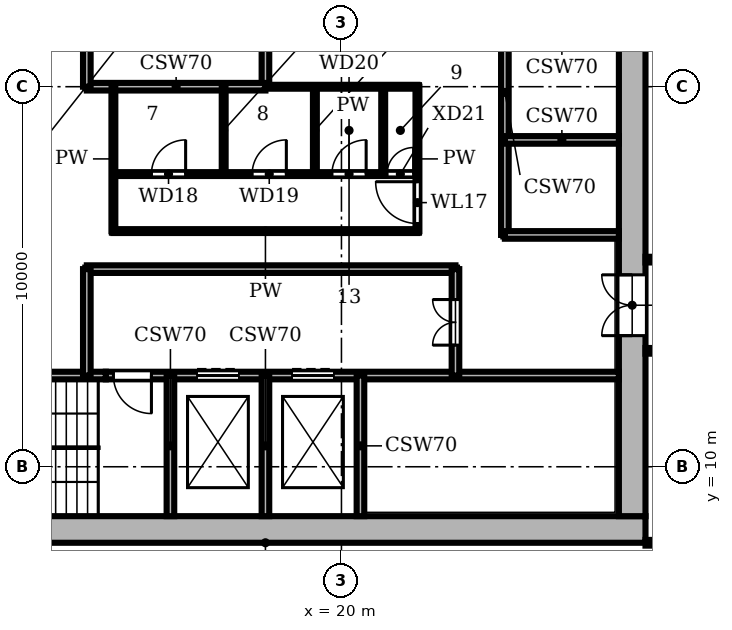
"""IFC4 building model, lengths in metres.
Left out: names, types, materials, properties, quantities, classifications, styles, units other than length and angle.
Written with IfcOpenShell. Run it as: python <this file> out.ifc"""

import sys

from ifc_helpers import new_model, si_unit, direction, frame, frame_2d, origin, place, context, subcontext, project, spatial, rectangle, extrude, element, fill, save


model = new_model("IFC4")
c1 = context("Model", 3, precision=1e-05, world=origin(), true_north=direction((0.0, 1.0)))
c2 = subcontext(c1, "Body", "Model", "MODEL_VIEW")
j1 = project(units=[si_unit("LENGTHUNIT", "METRE"), si_unit("PLANEANGLEUNIT", "RADIAN")], contexts=[c1])
p1 = place(None, origin())
s1 = spatial("IfcSite", under=j1, at=p1, CompositionType="ELEMENT")
p2 = place(p1, origin())
s2 = spatial("IfcBuilding", under=s1, at=p2, CompositionType="ELEMENT")
p3 = place(p2, frame((0.0, 0.0, 209.7)))
s3 = spatial("IfcBuildingStorey", under=s2, at=p3, CompositionType="ELEMENT", Elevation=209.7)
p4 = place(p3, frame((8.0, 8.35, 0.0), z_axis=(0.0, 0.0, 1.0), x_axis=(1.0, 0.0, 0.0)))
e1 = element("IfcWall", 1, at=p4, inside=s3, PredefinedType="SHEAR", context=c2, shape_type="SweptSolid", body=[
    extrude(rectangle(XDim=20.0, YDim=0.7, at=frame_2d((10.0, 0.0))), origin(), (0.0, 0.0, 1.0), 3.9),
])
p5 = place(p3, frame((27.65, 8.7, 0.0), z_axis=(0.0, 0.0, 1.0), x_axis=(0.0, 1.0, 0.0)))
e2 = element("IfcWall", 2, at=p5, inside=s3, PredefinedType="SHEAR", context=c2, shape_type="SweptSolid", body=[
    extrude(rectangle(XDim=18.6, YDim=0.7, at=frame_2d((9.3, 0.0))), origin(), (0.0, 0.0, 1.0), 3.9),
])
p6 = place(p5, frame((4.75, 0.0, 0.0)))
e3 = element("IfcOpeningElement", 3, at=p6, cuts=e2, PredefinedType="OPENING", context=c2, shape_type="SweptSolid", body=[
    extrude(rectangle(XDim=1.6, YDim=2.1, at=frame_2d((0.8, 1.05))), frame((0.0, 0.36, 0.0), z_axis=(0.0, -1.0, 0.0), x_axis=(1.0, 0.0, 0.0)), (0.0, 0.0, 1.0), 0.72),
])
p7 = place(p3, frame((8.7, 12.4, 0.0), z_axis=(0.0, 0.0, 1.0), x_axis=(1.0, 0.0, 0.0)))
e4 = element("IfcWall", 4, at=p7, inside=s3, PredefinedType="SHEAR", context=c2, shape_type="SweptSolid", body=[
    extrude(rectangle(XDim=5.1, YDim=0.2, at=frame_2d((2.55, 0.0))), origin(), (0.0, 0.0, 1.0), 3.58),
])
p8 = place(p3, frame((13.8, 12.4, 0.0), z_axis=(0.0, 0.0, 1.0), x_axis=(1.0, 0.0, 0.0)))
e5 = element("IfcWall", 5, at=p8, inside=s3, PredefinedType="SHEAR", context=c2, shape_type="SweptSolid", body=[
    extrude(rectangle(XDim=13.5, YDim=0.2, at=frame_2d((6.75, 0.0))), origin(), (0.0, 0.0, 1.0), 3.58),
])
p9 = place(p8, frame((2.4, 0.0, 0.0)))
e6 = element("IfcOpeningElement", 6, at=p9, cuts=e5, PredefinedType="OPENING", context=c2, shape_type="SweptSolid", body=[
    extrude(rectangle(XDim=1.1, YDim=2.1, at=frame_2d((0.55, 1.05))), frame((0.0, 0.11, 0.0), z_axis=(0.0, -1.0, 0.0), x_axis=(1.0, 0.0, 0.0)), (0.0, 0.0, 1.0), 0.22),
])
p10 = place(p8, frame((4.9, 0.0, 0.0)))
e7 = element("IfcOpeningElement", 7, at=p10, cuts=e5, PredefinedType="OPENING", context=c2, shape_type="SweptSolid", body=[
    extrude(rectangle(XDim=1.1, YDim=2.1, at=frame_2d((0.55, 1.05))), frame((0.0, 0.11, 0.0), z_axis=(0.0, -1.0, 0.0), x_axis=(1.0, 0.0, 0.0)), (0.0, 0.0, 1.0), 0.22),
])
p11 = place(p8, frame((0.2, 0.0, 0.0)))
e8 = element("IfcOpeningElement", 8, at=p11, cuts=e5, PredefinedType="OPENING", context=c2, shape_type="SweptSolid", body=[
    extrude(rectangle(XDim=1.0, YDim=2.1, at=frame_2d((0.5, 1.05))), frame((0.0, 0.11, 0.0), z_axis=(0.0, -1.0, 0.0), x_axis=(1.0, 0.0, 0.0)), (0.0, 0.0, 1.0), 0.22),
])
p12 = place(p3, frame((13.3, 15.2, 0.0), z_axis=(0.0, 0.0, 1.0), x_axis=(1.0, 0.0, 0.0)))
e9 = element("IfcWall", 9, at=p12, inside=s3, PredefinedType="SHEAR", context=c2, shape_type="SweptSolid", body=[
    extrude(rectangle(XDim=9.7, YDim=0.2, at=frame_2d((4.85, 0.0))), origin(), (0.0, 0.0, 1.0), 3.58),
])
p13 = place(p3, frame((24.3, 16.1, 0.0), z_axis=(0.0, 0.0, 1.0), x_axis=(1.0, 0.0, 0.0)))
e10 = element("IfcWall", 10, at=p13, inside=s3, PredefinedType="SHEAR", context=c2, shape_type="SweptSolid", body=[
    extrude(rectangle(XDim=3.0, YDim=0.2, at=frame_2d((1.5, 0.0))), origin(), (0.0, 0.0, 1.0), 3.58),
])
p14 = place(p3, frame((14.0, 16.2, 0.0), z_axis=(0.0, 0.0, 1.0), x_axis=(1.0, 0.0, 0.0)))
e11 = element("IfcWall", 11, at=p14, inside=s3, PredefinedType="PARTITIONING", context=c2, shape_type="SweptSolid", body=[
    extrude(rectangle(XDim=8.0, YDim=0.1, at=frame_2d((4.0, 0.0))), origin(), (0.0, 0.0, 1.0), 3.58),
])
p15 = place(p3, frame((14.0, 17.7, 0.0), z_axis=(0.0, 0.0, 1.0), x_axis=(1.0, 0.0, 0.0)))
e12 = element("IfcWall", 12, at=p15, inside=s3, PredefinedType="PARTITIONING", context=c2, shape_type="SweptSolid", body=[
    extrude(rectangle(XDim=8.0, YDim=0.1, at=frame_2d((4.0, 0.0))), origin(), (0.0, 0.0, 1.0), 3.58),
])
p16 = place(p15, frame((1.0, 0.0, 0.0)))
e13 = element("IfcOpeningElement", 13, at=p16, cuts=e12, PredefinedType="OPENING", context=c2, shape_type="SweptSolid", body=[
    extrude(rectangle(XDim=0.9, YDim=2.1, at=frame_2d((0.45, 1.05))), frame((0.0, 0.06, 0.0), z_axis=(0.0, -1.0, 0.0), x_axis=(1.0, 0.0, 0.0)), (0.0, 0.0, 1.0), 0.12),
])
p17 = place(p15, frame((3.65, 0.0, 0.0)))
e14 = element("IfcOpeningElement", 14, at=p17, cuts=e12, PredefinedType="OPENING", context=c2, shape_type="SweptSolid", body=[
    extrude(rectangle(XDim=0.9, YDim=2.1, at=frame_2d((0.45, 1.05))), frame((0.0, 0.06, 0.0), z_axis=(0.0, -1.0, 0.0), x_axis=(1.0, 0.0, 0.0)), (0.0, 0.0, 1.0), 0.12),
])
p18 = place(p15, frame((5.75, 0.0, 0.0)))
e15 = element("IfcOpeningElement", 15, at=p18, cuts=e12, PredefinedType="OPENING", context=c2, shape_type="SweptSolid", body=[
    extrude(rectangle(XDim=0.9, YDim=2.1, at=frame_2d((0.45, 1.05))), frame((0.0, 0.06, 0.0), z_axis=(0.0, -1.0, 0.0), x_axis=(1.0, 0.0, 0.0)), (0.0, 0.0, 1.0), 0.12),
])
p19 = place(p15, frame((7.2, 0.0, 0.0)))
e16 = element("IfcOpeningElement", 16, at=p19, cuts=e12, PredefinedType="OPENING", context=c2, shape_type="SweptSolid", body=[
    extrude(rectangle(XDim=0.7, YDim=2.1, at=frame_2d((0.35, 1.05))), frame((0.0, 0.06, 0.0), z_axis=(0.0, -1.0, 0.0), x_axis=(1.0, 0.0, 0.0)), (0.0, 0.0, 1.0), 0.12),
])
p20 = place(p3, frame((24.3, 18.6, 0.0), z_axis=(0.0, 0.0, 1.0), x_axis=(1.0, 0.0, 0.0)))
e17 = element("IfcWall", 17, at=p20, inside=s3, PredefinedType="SHEAR", context=c2, shape_type="SweptSolid", body=[
    extrude(rectangle(XDim=3.0, YDim=0.2, at=frame_2d((1.5, 0.0))), origin(), (0.0, 0.0, 1.0), 3.58),
])
p21 = place(p3, frame((18.0, 20.0, 0.0), z_axis=(0.0, 0.0, 1.0), x_axis=(1.0, 0.0, 0.0)))
e18 = element("IfcWall", 18, at=p21, inside=s3, PredefinedType="PARTITIONING", context=c2, shape_type="SweptSolid", body=[
    extrude(rectangle(XDim=4.0, YDim=0.1, at=frame_2d((2.0, 0.0))), origin(), (0.0, 0.0, 1.0), 3.58),
])
p22 = place(p3, frame((13.3, 20.0, 0.0), z_axis=(0.0, 0.0, 1.0), x_axis=(1.0, 0.0, 0.0)))
e19 = element("IfcWall", 19, at=p22, inside=s3, PredefinedType="SHEAR", context=c2, shape_type="SweptSolid", body=[
    extrude(rectangle(XDim=4.7, YDim=0.2, at=frame_2d((2.35, 0.0))), origin(), (0.0, 0.0, 1.0), 3.58),
])
p23 = place(p3, frame((13.3, 12.4, 0.0), z_axis=(0.0, 0.0, 1.0), x_axis=(0.0, 1.0, 0.0)))
e20 = element("IfcWall", 20, at=p23, inside=s3, PredefinedType="SHEAR", context=c2, shape_type="SweptSolid", body=[
    extrude(rectangle(XDim=2.8, YDim=0.2, at=frame_2d((1.4, 0.0))), origin(), (0.0, 0.0, 1.0), 3.58),
])
p24 = place(p3, frame((13.3, 20.0, 0.0), z_axis=(0.0, 0.0, 1.0), x_axis=(0.0, 1.0, 0.0)))
e21 = element("IfcWall", 21, at=p24, inside=s3, PredefinedType="SHEAR", context=c2, shape_type="SweptSolid", body=[
    extrude(rectangle(XDim=3.6, YDim=0.2, at=frame_2d((1.8, 0.0))), origin(), (0.0, 0.0, 1.0), 3.58),
])
p25 = place(p3, frame((14.0, 16.2, 0.0), z_axis=(0.0, 0.0, 1.0), x_axis=(0.0, 1.0, 0.0)))
e22 = element("IfcWall", 22, at=p25, inside=s3, PredefinedType="PARTITIONING", context=c2, shape_type="SweptSolid", body=[
    extrude(rectangle(XDim=3.8, YDim=0.1, at=frame_2d((1.9, 0.0))), origin(), (0.0, 0.0, 1.0), 3.58),
])
p26 = place(p3, frame((15.5, 8.7, 0.0), z_axis=(0.0, 0.0, 1.0), x_axis=(0.0, 1.0, 0.0)))
e23 = element("IfcWall", 23, at=p26, inside=s3, PredefinedType="SHEAR", context=c2, shape_type="SweptSolid", body=[
    extrude(rectangle(XDim=3.7, YDim=0.2, at=frame_2d((1.85, 0.0))), origin(), (0.0, 0.0, 1.0), 3.58),
])
p27 = place(p3, frame((16.9, 17.7, 0.0), z_axis=(0.0, 0.0, 1.0), x_axis=(0.0, 1.0, 0.0)))
e24 = element("IfcWall", 24, at=p27, inside=s3, PredefinedType="PARTITIONING", context=c2, shape_type="SweptSolid", body=[
    extrude(rectangle(XDim=2.3, YDim=0.1, at=frame_2d((1.15, 0.0))), origin(), (0.0, 0.0, 1.0), 3.58),
])
p28 = place(p3, frame((18.0, 8.7, 0.0), z_axis=(0.0, 0.0, 1.0), x_axis=(0.0, 1.0, 0.0)))
e25 = element("IfcWall", 25, at=p28, inside=s3, PredefinedType="SHEAR", context=c2, shape_type="SweptSolid", body=[
    extrude(rectangle(XDim=3.7, YDim=0.2, at=frame_2d((1.85, 0.0))), origin(), (0.0, 0.0, 1.0), 3.58),
])
p29 = place(p3, frame((18.0, 20.0, 0.0), z_axis=(0.0, 0.0, 1.0), x_axis=(0.0, 1.0, 0.0)))
e26 = element("IfcWall", 26, at=p29, inside=s3, PredefinedType="SHEAR", context=c2, shape_type="SweptSolid", body=[
    extrude(rectangle(XDim=7.3, YDim=0.2, at=frame_2d((3.65, 0.0))), origin(), (0.0, 0.0, 1.0), 3.58),
])
p30 = place(p29, frame((1.2, 0.0, 0.0)))
e27 = element("IfcOpeningElement", 27, at=p30, cuts=e26, PredefinedType="OPENING", context=c2, shape_type="SweptSolid", body=[
    extrude(rectangle(XDim=1.2, YDim=2.1, at=frame_2d((0.6, 1.05))), frame((0.0, 0.11, 0.0), z_axis=(0.0, -1.0, 0.0), x_axis=(1.0, 0.0, 0.0)), (0.0, 0.0, 1.0), 0.22),
])
p31 = place(p3, frame((19.3, 17.7, 0.0), z_axis=(0.0, 0.0, 1.0), x_axis=(0.0, 1.0, 0.0)))
e28 = element("IfcWall", 28, at=p31, inside=s3, PredefinedType="PARTITIONING", context=c2, shape_type="SweptSolid", body=[
    extrude(rectangle(XDim=2.3, YDim=0.1, at=frame_2d((1.15, 0.0))), origin(), (0.0, 0.0, 1.0), 3.58),
])
p32 = place(p3, frame((20.5, 8.7, 0.0), z_axis=(0.0, 0.0, 1.0), x_axis=(0.0, 1.0, 0.0)))
e29 = element("IfcWall", 29, at=p32, inside=s3, PredefinedType="SHEAR", context=c2, shape_type="SweptSolid", body=[
    extrude(rectangle(XDim=3.7, YDim=0.2, at=frame_2d((1.85, 0.0))), origin(), (0.0, 0.0, 1.0), 3.58),
])
p33 = place(p3, frame((21.1, 17.7, 0.0), z_axis=(0.0, 0.0, 1.0), x_axis=(0.0, 1.0, 0.0)))
e30 = element("IfcWall", 30, at=p33, inside=s3, PredefinedType="PARTITIONING", context=c2, shape_type="SweptSolid", body=[
    extrude(rectangle(XDim=2.3, YDim=0.1, at=frame_2d((1.15, 0.0))), origin(), (0.0, 0.0, 1.0), 3.58),
])
p34 = place(p3, frame((22.0, 16.2, 0.0), z_axis=(0.0, 0.0, 1.0), x_axis=(0.0, 1.0, 0.0)))
e31 = element("IfcWall", 31, at=p34, inside=s3, PredefinedType="PARTITIONING", context=c2, shape_type="SweptSolid", body=[
    extrude(rectangle(XDim=3.8, YDim=0.1, at=frame_2d((1.9, 0.0))), origin(), (0.0, 0.0, 1.0), 3.58),
])
p35 = place(p34, frame((0.2, 0.0, 0.0)))
e32 = element("IfcOpeningElement", 32, at=p35, cuts=e31, PredefinedType="OPENING", context=c2, shape_type="SweptSolid", body=[
    extrude(rectangle(XDim=1.1, YDim=2.1, at=frame_2d((0.55, 1.05))), frame((0.0, 0.06, 0.0), z_axis=(0.0, -1.0, 0.0), x_axis=(1.0, 0.0, 0.0)), (0.0, 0.0, 1.0), 0.12),
])
p36 = place(p3, frame((23.0, 12.4, 0.0), z_axis=(0.0, 0.0, 1.0), x_axis=(0.0, 1.0, 0.0)))
e33 = element("IfcWall", 33, at=p36, inside=s3, PredefinedType="SHEAR", context=c2, shape_type="SweptSolid", body=[
    extrude(rectangle(XDim=2.8, YDim=0.2, at=frame_2d((1.4, 0.0))), origin(), (0.0, 0.0, 1.0), 3.58),
])
p37 = place(p36, frame((0.8, 0.0, 0.0)))
e34 = element("IfcOpeningElement", 34, at=p37, cuts=e33, PredefinedType="OPENING", context=c2, shape_type="SweptSolid", body=[
    extrude(rectangle(XDim=1.2, YDim=2.1, at=frame_2d((0.6, 1.05))), frame((0.0, 0.11, 0.0), z_axis=(0.0, -1.0, 0.0), x_axis=(1.0, 0.0, 0.0)), (0.0, 0.0, 1.0), 0.22),
])
p38 = place(p3, frame((24.3, 16.1, 0.0), z_axis=(0.0, 0.0, 1.0), x_axis=(0.0, 1.0, 0.0)))
e35 = element("IfcWall", 35, at=p38, inside=s3, PredefinedType="SHEAR", context=c2, shape_type="SweptSolid", body=[
    extrude(rectangle(XDim=7.5, YDim=0.2, at=frame_2d((3.75, 0.0))), origin(), (0.0, 0.0, 1.0), 3.58),
])
p39 = place(p38, frame((5.7, 0.0, 0.0)))
e36 = element("IfcOpeningElement", 36, at=p39, cuts=e35, PredefinedType="OPENING", context=c2, shape_type="SweptSolid", body=[
    extrude(rectangle(XDim=1.1, YDim=2.1, at=frame_2d((0.55, 1.05))), frame((0.0, 0.11, 0.0), z_axis=(0.0, -1.0, 0.0), x_axis=(1.0, 0.0, 0.0)), (0.0, 0.0, 1.0), 0.22),
])
for number, where, z_axis, x_axis in (
    (37, (28.0, 8.0, 0.0), (0.0, 0.0, 1.0), (1.0, 0.0, 0.0)),
    (38, (28.0, 13.05, 0.0), (0.0, 0.0, 1.0), (1.0, 0.0, 0.0)),
    (39, (28.0, 15.45, 0.0), (0.0, 0.0, 1.0), (1.0, 0.0, 0.0)),
):
    element("IfcWall", number, at=place(p3, frame(where, z_axis=z_axis, x_axis=x_axis)), inside=s3, PredefinedType="PARTITIONING", context=c2, shape_type="SweptSolid", body=[
        extrude(rectangle(XDim=2.8, YDim=0.15, at=frame_2d((1.4, 0.0))), origin(), (0.0, 0.0, 1.0), 3.58),
    ])
p40 = place(p9, origin())
e40 = element("IfcDoor", 40, at=p40, inside=s3, OperationType="DOUBLE_DOOR_SLIDING", PredefinedType="DOOR", context=c2, shape_type="SweptSolid", body=[
    extrude(rectangle(XDim=1.1, YDim=2.1, at=frame_2d((0.55, 1.05))), frame((0.0, 0.025, 0.0), z_axis=(0.0, -1.0, 0.0), x_axis=(1.0, 0.0, 0.0)), (0.0, 0.0, 1.0), 0.05),
])
fill(e6, e40)
p41 = place(p10, origin())
e41 = element("IfcDoor", 41, at=p41, inside=s3, OperationType="DOUBLE_DOOR_SLIDING", PredefinedType="DOOR", context=c2, shape_type="SweptSolid", body=[
    extrude(rectangle(XDim=1.1, YDim=2.1, at=frame_2d((0.55, 1.05))), frame((0.0, 0.025, 0.0), z_axis=(0.0, -1.0, 0.0), x_axis=(1.0, 0.0, 0.0)), (0.0, 0.0, 1.0), 0.05),
])
fill(e7, e41)
p42 = place(p11, frame((1.0, 0.0, 0.0), z_axis=(0.0, 0.0, 1.0), x_axis=(-1.0, 0.0, 0.0)))
e42 = element("IfcDoor", 42, at=p42, inside=s3, OperationType="SINGLE_SWING_LEFT", PredefinedType="DOOR", context=c2, shape_type="SweptSolid", body=[
    extrude(rectangle(XDim=1.0, YDim=2.1, at=frame_2d((0.5, 1.05))), frame((0.0, 0.025, 0.0), z_axis=(0.0, -1.0, 0.0), x_axis=(1.0, 0.0, 0.0)), (0.0, 0.0, 1.0), 0.05),
])
fill(e8, e42)
p43 = place(p37, origin())
e43 = element("IfcDoor", 43, at=p43, inside=s3, OperationType="DOUBLE_DOOR_SINGLE_SWING", PredefinedType="DOOR", context=c2, shape_type="SweptSolid", body=[
    extrude(rectangle(XDim=1.2, YDim=2.1, at=frame_2d((0.6, 1.05))), frame((0.0, 0.025, 0.0), z_axis=(0.0, -1.0, 0.0), x_axis=(1.0, 0.0, 0.0)), (0.0, 0.0, 1.0), 0.05),
])
fill(e34, e43)
p44 = place(p35, origin())
e44 = element("IfcDoor", 44, at=p44, inside=s3, OperationType="SINGLE_SWING_RIGHT", PredefinedType="DOOR", context=c2, shape_type="SweptSolid", body=[
    extrude(rectangle(XDim=1.1, YDim=2.1, at=frame_2d((0.55, 1.05))), frame((0.0, 0.025, 0.0), z_axis=(0.0, -1.0, 0.0), x_axis=(1.0, 0.0, 0.0)), (0.0, 0.0, 1.0), 0.05),
])
fill(e32, e44)
p45 = place(p16, origin())
e45 = element("IfcDoor", 45, at=p45, inside=s3, OperationType="SINGLE_SWING_RIGHT", PredefinedType="DOOR", context=c2, shape_type="SweptSolid", body=[
    extrude(rectangle(XDim=0.9, YDim=2.1, at=frame_2d((0.45, 1.05))), frame((0.0, 0.025, 0.0), z_axis=(0.0, -1.0, 0.0), x_axis=(1.0, 0.0, 0.0)), (0.0, 0.0, 1.0), 0.05),
])
fill(e13, e45)
p46 = place(p17, origin())
e46 = element("IfcDoor", 46, at=p46, inside=s3, OperationType="SINGLE_SWING_RIGHT", PredefinedType="DOOR", context=c2, shape_type="SweptSolid", body=[
    extrude(rectangle(XDim=0.9, YDim=2.1, at=frame_2d((0.45, 1.05))), frame((0.0, 0.025, 0.0), z_axis=(0.0, -1.0, 0.0), x_axis=(1.0, 0.0, 0.0)), (0.0, 0.0, 1.0), 0.05),
])
fill(e14, e46)
p47 = place(p18, origin())
e47 = element("IfcDoor", 47, at=p47, inside=s3, OperationType="SINGLE_SWING_RIGHT", PredefinedType="DOOR", context=c2, shape_type="SweptSolid", body=[
    extrude(rectangle(XDim=0.9, YDim=2.1, at=frame_2d((0.45, 1.05))), frame((0.0, 0.025, 0.0), z_axis=(0.0, -1.0, 0.0), x_axis=(1.0, 0.0, 0.0)), (0.0, 0.0, 1.0), 0.05),
])
fill(e15, e47)
p48 = place(p19, origin())
e48 = element("IfcDoor", 48, at=p48, inside=s3, OperationType="SINGLE_SWING_RIGHT", PredefinedType="DOOR", context=c2, shape_type="SweptSolid", body=[
    extrude(rectangle(XDim=0.7, YDim=2.1, at=frame_2d((0.35, 1.05))), frame((0.0, 0.025, 0.0), z_axis=(0.0, -1.0, 0.0), x_axis=(1.0, 0.0, 0.0)), (0.0, 0.0, 1.0), 0.05),
])
fill(e16, e48)
p49 = place(p6, origin())
e49 = element("IfcDoor", 49, at=p49, inside=s3, OperationType="DOUBLE_DOOR_SINGLE_SWING", PredefinedType="DOOR", context=c2, shape_type="SweptSolid", body=[
    extrude(rectangle(XDim=1.6, YDim=2.1, at=frame_2d((0.8, 1.05))), frame((0.0, 0.025, 0.0), z_axis=(0.0, -1.0, 0.0), x_axis=(1.0, 0.0, 0.0)), (0.0, 0.0, 1.0), 0.05),
])
fill(e3, e49)
save(model, sys.argv[1])
